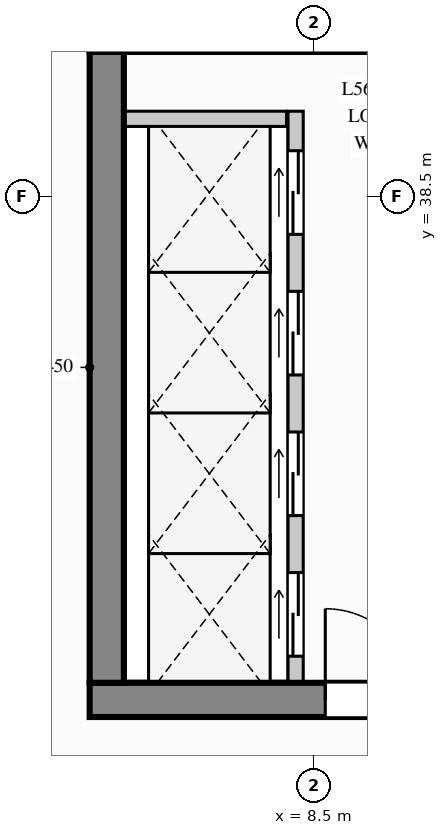
"""IFC4 building model, lengths in metres.
Left out: names, types, materials, properties, quantities, classifications, styles, units other than length and angle.
Written with IfcOpenShell. Run it as: python <this file> out.ifc"""

import sys

from ifc_helpers import new_model, si_unit, direction, frame, frame_2d, origin, place, context, subcontext, project, spatial, rectangle, extrude, element, fill, save


model = new_model("IFC4")
c1 = context("Model", 3, precision=1e-05, world=origin(), true_north=direction((0.0, 1.0)))
c2 = subcontext(c1, "Body", "Model", "MODEL_VIEW")
j1 = project(units=[si_unit("LENGTHUNIT", "METRE"), si_unit("PLANEANGLEUNIT", "RADIAN")], contexts=[c1])
p1 = place(None, origin())
s1 = spatial("IfcSite", under=j1, at=p1, CompositionType="ELEMENT")
p2 = place(p1, origin())
s2 = spatial("IfcBuilding", under=s1, at=p2, CompositionType="ELEMENT")
p3 = place(p2, frame((0.0, 0.0, 235.1)))
s3 = spatial("IfcBuildingStorey", under=s2, at=p3, CompositionType="ELEMENT", Elevation=235.1)
p4 = place(p3, frame((5.55, 31.875, 0.0), z_axis=(0.0, 0.0, 1.0), x_axis=(1.0, 0.0, 0.0)))
e1 = element("IfcWall", 1, at=p4, inside=s3, PredefinedType="SHEAR", context=c2, shape_type="SweptSolid", body=[
    extrude(rectangle(XDim=17.75, YDim=0.45, at=frame_2d((8.875, 0.0))), origin(), (0.0, 0.0, 1.0), 3.95),
])
p5 = place(p4, frame((3.1, 0.0, 0.0)))
e2 = element("IfcOpeningElement", 2, at=p5, cuts=e1, PredefinedType="OPENING", context=c2, shape_type="SweptSolid", body=[
    extrude(rectangle(XDim=1.2, YDim=2.2, at=frame_2d((0.6, 1.1))), frame((0.0, 0.235, 0.0), z_axis=(0.0, -1.0, 0.0), x_axis=(1.0, 0.0, 0.0)), (0.0, 0.0, 1.0), 0.47),
])
p6 = place(p4, frame((6.95, 0.0, 0.0)))
e3 = element("IfcOpeningElement", 3, at=p6, cuts=e1, PredefinedType="OPENING", context=c2, shape_type="SweptSolid", body=[
    extrude(rectangle(XDim=1.2, YDim=2.2, at=frame_2d((0.6, 1.1))), frame((0.0, 0.235, 0.0), z_axis=(0.0, -1.0, 0.0), x_axis=(1.0, 0.0, 0.0)), (0.0, 0.0, 1.0), 0.47),
])
p7 = place(p4, frame((8.8, 0.0, 0.0)))
e4 = element("IfcOpeningElement", 4, at=p7, cuts=e1, PredefinedType="OPENING", context=c2, shape_type="SweptSolid", body=[
    extrude(rectangle(XDim=1.15, YDim=2.2, at=frame_2d((0.575, 1.1))), frame((0.0, 0.235, 0.0), z_axis=(0.0, -1.0, 0.0), x_axis=(1.0, 0.0, 0.0)), (0.0, 0.0, 1.0), 0.47),
])
p8 = place(p4, frame((15.9, 0.0, 0.0)))
e5 = element("IfcOpeningElement", 5, at=p8, cuts=e1, PredefinedType="OPENING", context=c2, shape_type="SweptSolid", body=[
    extrude(rectangle(XDim=1.2, YDim=2.2, at=frame_2d((0.6, 1.1))), frame((0.0, 0.235, 0.0), z_axis=(0.0, -1.0, 0.0), x_axis=(1.0, 0.0, 0.0)), (0.0, 0.0, 1.0), 0.47),
])
p9 = place(p3, frame((5.775, 32.1, 0.0), z_axis=(0.0, 0.0, 1.0), x_axis=(0.0, 1.0, 0.0)))
e6 = element("IfcWall", 6, at=p9, inside=s3, PredefinedType="SHEAR", context=c2, shape_type="SweptSolid", body=[
    extrude(rectangle(XDim=8.3, YDim=0.45, at=frame_2d((4.15, 0.0))), origin(), (0.0, 0.0, 1.0), 3.95),
])
p10 = place(p3, frame((6.933, 4.52, 0.0), z_axis=(0.0, 0.0, 1.0), x_axis=(-0.109965284523, 0.993935428587, 0.0)))
e7 = element("IfcWall", 7, at=p10, inside=s3, PredefinedType="STANDARD", context=c2, shape_type="SweptSolid", body=[
    extrude(rectangle(XDim=37.186, YDim=0.24, at=frame_2d((18.593, 0.0))), origin(), (0.0, 0.0, 1.0), 3.7),
])
p11 = place(p10, frame((12.562, 0.0, 0.9)))
e8 = element("IfcOpeningElement", 8, at=p11, cuts=e7, PredefinedType="OPENING", context=c2, shape_type="SweptSolid", body=[
    extrude(rectangle(XDim=1.65, YDim=1.95, at=frame_2d((0.825, 0.975))), frame((0.0, 0.13, 0.0), z_axis=(0.0, -1.0, 0.0), x_axis=(1.0, 0.0, 0.0)), (0.0, 0.0, 1.0), 0.26),
])
p12 = place(p3, frame((8.26, 32.12, 0.0), z_axis=(0.0, 0.0, 1.0), x_axis=(0.0, 1.0, 0.0)))
e9 = element("IfcWall", 9, at=p12, inside=s3, PredefinedType="PARTITIONING", context=c2, shape_type="SweptSolid", body=[
    extrude(rectangle(XDim=7.5, YDim=0.2, at=frame_2d((3.75, 0.0))), origin(), (0.0, 0.0, 1.0), 3.7),
])
p13 = place(p12, frame((0.33, 0.0, 0.0)))
e10 = element("IfcOpeningElement", 10, at=p13, cuts=e9, PredefinedType="OPENING", context=c2, shape_type="SweptSolid", body=[
    extrude(rectangle(XDim=1.1, YDim=2.2, at=frame_2d((0.55, 1.1))), frame((0.0, 0.11, 0.0), z_axis=(0.0, -1.0, 0.0), x_axis=(1.0, 0.0, 0.0)), (0.0, 0.0, 1.0), 0.22),
])
p14 = place(p12, frame((2.18, 0.0, 0.0)))
e11 = element("IfcOpeningElement", 11, at=p14, cuts=e9, PredefinedType="OPENING", context=c2, shape_type="SweptSolid", body=[
    extrude(rectangle(XDim=1.1, YDim=2.2, at=frame_2d((0.55, 1.1))), frame((0.0, 0.11, 0.0), z_axis=(0.0, -1.0, 0.0), x_axis=(1.0, 0.0, 0.0)), (0.0, 0.0, 1.0), 0.22),
])
p15 = place(p12, frame((4.03, 0.0, 0.0)))
e12 = element("IfcOpeningElement", 12, at=p15, cuts=e9, PredefinedType="OPENING", context=c2, shape_type="SweptSolid", body=[
    extrude(rectangle(XDim=1.1, YDim=2.2, at=frame_2d((0.55, 1.1))), frame((0.0, 0.11, 0.0), z_axis=(0.0, -1.0, 0.0), x_axis=(1.0, 0.0, 0.0)), (0.0, 0.0, 1.0), 0.22),
])
p16 = place(p12, frame((5.88, 0.0, 0.0)))
e13 = element("IfcOpeningElement", 13, at=p16, cuts=e9, PredefinedType="OPENING", context=c2, shape_type="SweptSolid", body=[
    extrude(rectangle(XDim=1.1, YDim=2.2, at=frame_2d((0.55, 1.1))), frame((0.0, 0.11, 0.0), z_axis=(0.0, -1.0, 0.0), x_axis=(1.0, 0.0, 0.0)), (0.0, 0.0, 1.0), 0.22),
])
p17 = place(p3, frame((6.02, 39.52, 0.0), z_axis=(0.0, 0.0, 1.0), x_axis=(1.0, 0.0, 0.0)))
e14 = element("IfcWall", 14, at=p17, inside=s3, PredefinedType="PARTITIONING", context=c2, shape_type="SweptSolid", body=[
    extrude(rectangle(XDim=2.12, YDim=0.2, at=frame_2d((1.06, 0.0))), origin(), (0.0, 0.0, 1.0), 3.7),
])
p18 = place(p5, origin())
e15 = element("IfcDoor", 15, at=p18, inside=s3, OperationType="SINGLE_SWING_LEFT", PredefinedType="DOOR", context=c2, shape_type="SweptSolid", body=[
    extrude(rectangle(XDim=1.2, YDim=2.2, at=frame_2d((0.6, 1.1))), frame((0.0, 0.025, 0.0), z_axis=(0.0, -1.0, 0.0), x_axis=(1.0, 0.0, 0.0)), (0.0, 0.0, 1.0), 0.05),
])
fill(e2, e15)
p19 = place(p13, origin())
e16 = element("IfcDoor", 16, at=p19, inside=s3, OperationType="DOUBLE_DOOR_SLIDING", PredefinedType="DOOR", context=c2, shape_type="SweptSolid", body=[
    extrude(rectangle(XDim=1.1, YDim=2.2, at=frame_2d((0.55, 1.1))), frame((0.0, 0.025, 0.0), z_axis=(0.0, -1.0, 0.0), x_axis=(1.0, 0.0, 0.0)), (0.0, 0.0, 1.0), 0.05),
])
fill(e10, e16)
p20 = place(p14, origin())
e17 = element("IfcDoor", 17, at=p20, inside=s3, OperationType="DOUBLE_DOOR_SLIDING", PredefinedType="DOOR", context=c2, shape_type="SweptSolid", body=[
    extrude(rectangle(XDim=1.1, YDim=2.2, at=frame_2d((0.55, 1.1))), frame((0.0, 0.025, 0.0), z_axis=(0.0, -1.0, 0.0), x_axis=(1.0, 0.0, 0.0)), (0.0, 0.0, 1.0), 0.05),
])
fill(e11, e17)
p21 = place(p15, origin())
e18 = element("IfcDoor", 18, at=p21, inside=s3, OperationType="DOUBLE_DOOR_SLIDING", PredefinedType="DOOR", context=c2, shape_type="SweptSolid", body=[
    extrude(rectangle(XDim=1.1, YDim=2.2, at=frame_2d((0.55, 1.1))), frame((0.0, 0.025, 0.0), z_axis=(0.0, -1.0, 0.0), x_axis=(1.0, 0.0, 0.0)), (0.0, 0.0, 1.0), 0.05),
])
fill(e12, e18)
p22 = place(p16, origin())
e19 = element("IfcDoor", 19, at=p22, inside=s3, OperationType="DOUBLE_DOOR_SLIDING", PredefinedType="DOOR", context=c2, shape_type="SweptSolid", body=[
    extrude(rectangle(XDim=1.1, YDim=2.2, at=frame_2d((0.55, 1.1))), frame((0.0, 0.025, 0.0), z_axis=(0.0, -1.0, 0.0), x_axis=(1.0, 0.0, 0.0)), (0.0, 0.0, 1.0), 0.05),
])
fill(e13, e19)
save(model, sys.argv[1])
